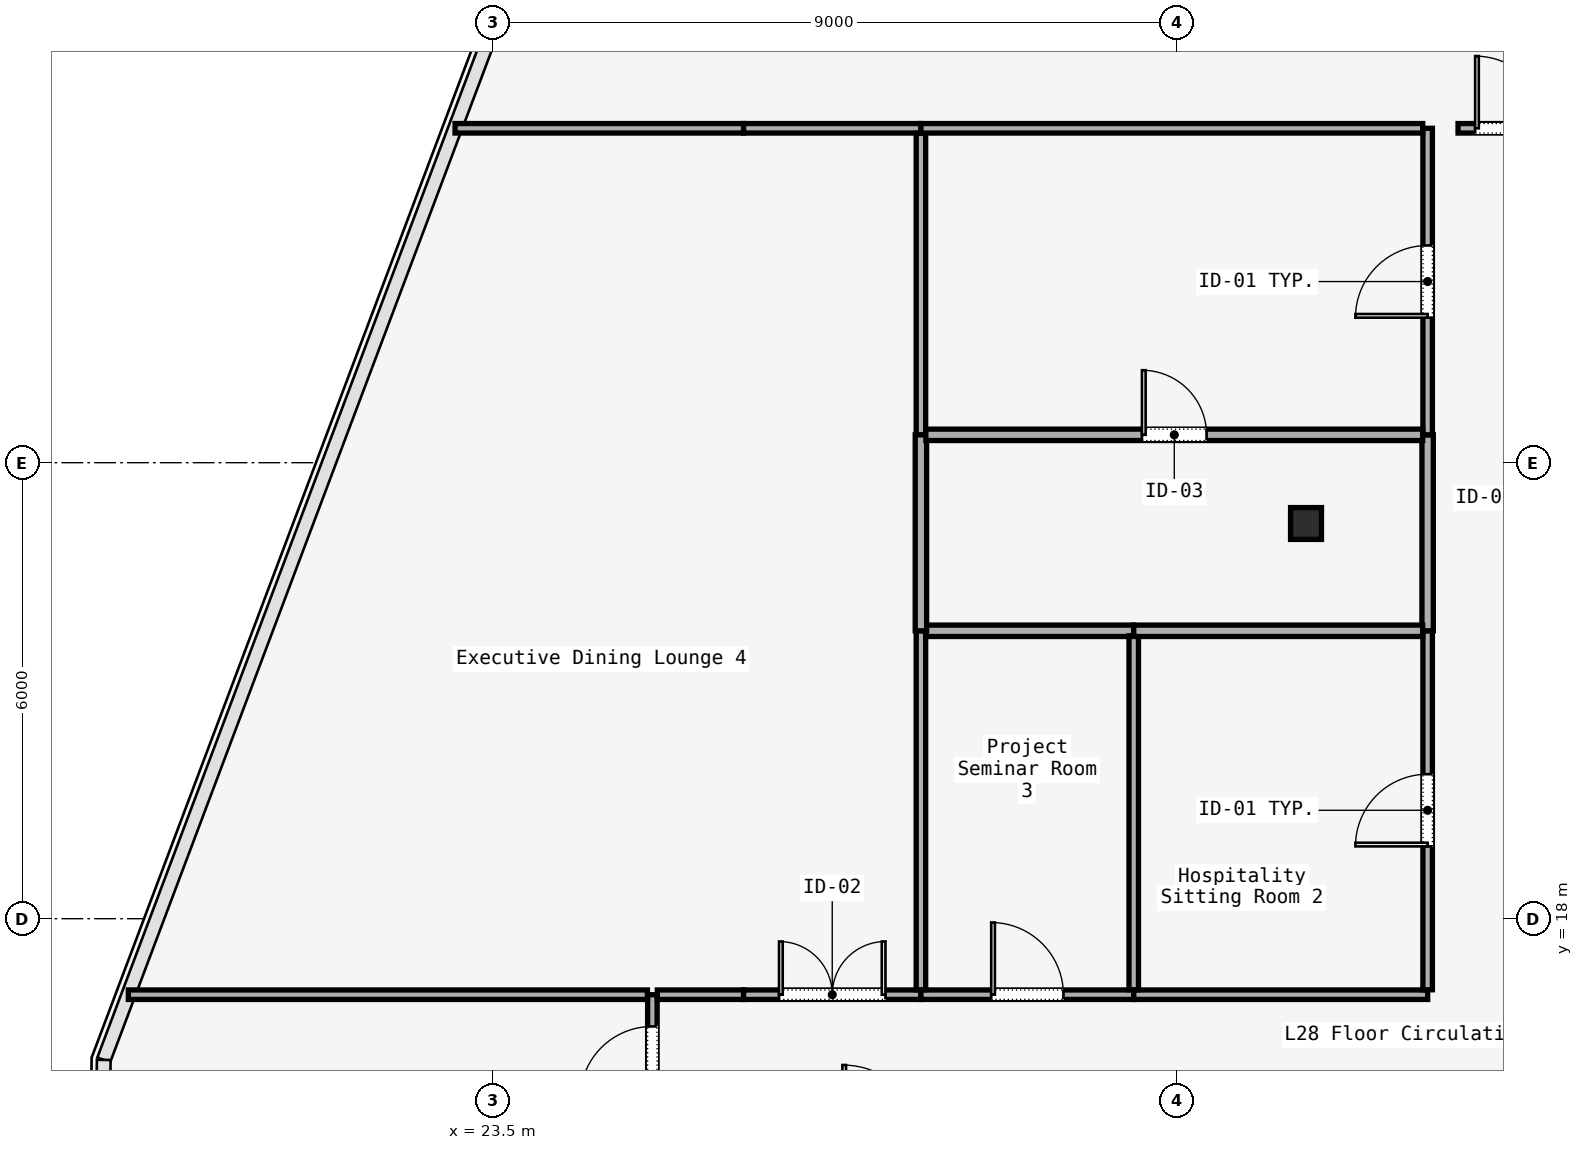
"""IFC4 building model, lengths in metres.
Left out: names, types, materials, properties, quantities, classifications, styles, units other than length and angle.
Written with IfcOpenShell. Run it as: python <this file> out.ifc"""

import sys

from ifc_helpers import new_model, si_unit, direction, frame, frame_2d, origin, origin_2d, place, context, subcontext, project, spatial, rectangle, i_section, extrude, element, fill, save


model = new_model("IFC4")
c1 = context("Model", 3, precision=1e-05, world=origin(), true_north=direction((0.0, 1.0)))
c2 = subcontext(c1, "Body", "Model", "MODEL_VIEW")
j1 = project(units=[si_unit("LENGTHUNIT", "METRE"), si_unit("PLANEANGLEUNIT", "RADIAN")], contexts=[c1])
p1 = place(None, origin())
s1 = spatial("IfcSite", under=j1, at=p1, CompositionType="ELEMENT")
p2 = place(p1, origin())
s2 = spatial("IfcBuilding", under=s1, at=p2, CompositionType="ELEMENT")
p3 = place(p2, frame((0.0, 0.0, 122.2)))
s3 = spatial("IfcBuildingStorey", under=s2, at=p3, CompositionType="ELEMENT", Elevation=122.2)
p4 = place(p3, frame((34.2, 23.2, 0.0), z_axis=(0.0, 0.0, 1.0), x_axis=(1.0, 0.0, 0.0)))
e1 = element("IfcColumn", 1, at=p4, inside=s3, PredefinedType="COLUMN", context=c2, shape_type="SweptSolid", body=[
    extrude(i_section(OverallWidth=0.407, OverallDepth=0.419, WebThickness=0.031, FlangeThickness=0.049, FilletRadius=0.015, at=origin_2d()), origin(), (0.0, 0.0, 1.0), 4.58),
])
p5 = place(p3, frame((25.6, 15.215, 0.0), z_axis=(0.0, 0.0, 1.0), x_axis=(0.0, 1.0, 0.0)))
e2 = element("IfcWall", 2, at=p5, inside=s3, PredefinedType="PARTITIONING", context=c2, shape_type="SweptSolid", body=[
    extrude(rectangle(XDim=1.785, YDim=0.125, at=frame_2d((0.893, 0.0))), origin(), (0.0, 0.0, 1.0), 4.01),
])
p6 = place(p5, frame((0.417, 0.0, 0.0)))
e3 = element("IfcOpeningElement", 3, at=p6, cuts=e2, PredefinedType="OPENING", context=c2, shape_type="SweptSolid", body=[
    extrude(rectangle(XDim=0.95, YDim=2.2, at=frame_2d((0.475, 1.1))), frame((0.0, 0.062, 0.0), z_axis=(0.0, -1.0, 0.0), x_axis=(1.0, 0.0, 0.0)), (0.0, 0.0, 1.0), 0.125),
])
p7 = place(p3, frame((25.665, 17.0, 0.0), z_axis=(0.0, 0.0, 1.0), x_axis=(1.0, 0.0, 0.0)))
e4 = element("IfcWall", 4, at=p7, inside=s3, PredefinedType="PARTITIONING", context=c2, shape_type="SweptSolid", body=[
    extrude(rectangle(XDim=1.135, YDim=0.125, at=frame_2d((0.567, 0.0))), origin(), (0.0, 0.0, 1.0), 4.01),
])
p8 = place(p3, frame((26.8, 17.0, 0.0), z_axis=(0.0, 0.0, 1.0), x_axis=(1.0, 0.0, 0.0)))
e5 = element("IfcWall", 5, at=p8, inside=s3, PredefinedType="PARTITIONING", context=c2, shape_type="SweptSolid", body=[
    extrude(rectangle(XDim=2.333, YDim=0.125, at=frame_2d((1.167, 0.0))), origin(), (0.0, 0.0, 1.0), 4.01),
])
p9 = place(p8, frame((0.467, 0.0, 0.0)))
e6 = element("IfcOpeningElement", 6, at=p9, cuts=e5, PredefinedType="OPENING", context=c2, shape_type="SweptSolid", body=[
    extrude(rectangle(XDim=1.4, YDim=2.2, at=frame_2d((0.7, 1.1))), frame((0.0, 0.062, 0.0), z_axis=(0.0, -1.0, 0.0), x_axis=(1.0, 0.0, 0.0)), (0.0, 0.0, 1.0), 0.125),
])
p10 = place(p3, frame((29.133, 17.0, 0.0), z_axis=(0.0, 0.0, 1.0), x_axis=(1.0, 0.0, 0.0)))
e7 = element("IfcWall", 7, at=p10, inside=s3, PredefinedType="PARTITIONING", context=c2, shape_type="SweptSolid", body=[
    extrude(rectangle(XDim=2.8, YDim=0.125, at=frame_2d((1.4, 0.0))), origin(), (0.0, 0.0, 1.0), 4.01),
])
p11 = place(p10, frame((0.925, 0.0, 0.0)))
e8 = element("IfcOpeningElement", 8, at=p11, cuts=e7, PredefinedType="OPENING", context=c2, shape_type="SweptSolid", body=[
    extrude(rectangle(XDim=0.95, YDim=2.2, at=frame_2d((0.475, 1.1))), frame((0.0, 0.062, 0.0), z_axis=(0.0, -1.0, 0.0), x_axis=(1.0, 0.0, 0.0)), (0.0, 0.0, 1.0), 0.125),
])
p12 = place(p3, frame((31.933, 17.0, 0.0), z_axis=(0.0, 0.0, 1.0), x_axis=(1.0, 0.0, 0.0)))
e9 = element("IfcWall", 9, at=p12, inside=s3, PredefinedType="PARTITIONING", context=c2, shape_type="SweptSolid", body=[
    extrude(rectangle(XDim=3.867, YDim=0.125, at=frame_2d((1.934, 0.0))), origin(), (0.0, 0.0, 1.0), 4.01),
])
p13 = place(p3, frame((35.8, 17.065, 0.0), z_axis=(0.0, 0.0, 1.0), x_axis=(0.0, 1.0, 0.0)))
e10 = element("IfcWall", 10, at=p13, inside=s3, PredefinedType="PARTITIONING", context=c2, shape_type="SweptSolid", body=[
    extrude(rectangle(XDim=4.723, YDim=0.125, at=frame_2d((2.362, 0.0))), origin(), (0.0, 0.0, 1.0), 4.01),
])
p14 = place(p13, frame((1.886, 0.0, 0.0)))
e11 = element("IfcOpeningElement", 11, at=p14, cuts=e10, PredefinedType="OPENING", context=c2, shape_type="SweptSolid", body=[
    extrude(rectangle(XDim=0.95, YDim=2.2, at=frame_2d((0.475, 1.1))), frame((0.0, 0.062, 0.0), z_axis=(0.0, -1.0, 0.0), x_axis=(1.0, 0.0, 0.0)), (0.0, 0.0, 1.0), 0.125),
])
p15 = place(p3, frame((35.8, 21.788, 0.0), z_axis=(0.0, 0.0, 1.0), x_axis=(0.0, 1.0, 0.0)))
e12 = element("IfcWall", 12, at=p15, inside=s3, PredefinedType="PARTITIONING", context=c2, shape_type="SweptSolid", body=[
    extrude(rectangle(XDim=2.579, YDim=0.15, at=frame_2d((1.289, 0.0))), origin(), (0.0, 0.0, 1.0), 4.01),
])
p16 = place(p3, frame((35.8, 24.367, 0.0), z_axis=(0.0, 0.0, 1.0), x_axis=(0.0, 1.0, 0.0)))
e13 = element("IfcWall", 13, at=p16, inside=s3, PredefinedType="PARTITIONING", context=c2, shape_type="SweptSolid", body=[
    extrude(rectangle(XDim=4.033, YDim=0.125, at=frame_2d((2.017, 0.0))), origin(), (0.0, 0.0, 1.0), 4.01),
])
p17 = place(p16, frame((1.542, 0.0, 0.0)))
e14 = element("IfcOpeningElement", 14, at=p17, cuts=e13, PredefinedType="OPENING", context=c2, shape_type="SweptSolid", body=[
    extrude(rectangle(XDim=0.95, YDim=2.2, at=frame_2d((0.475, 1.1))), frame((0.0, 0.062, 0.0), z_axis=(0.0, -1.0, 0.0), x_axis=(1.0, 0.0, 0.0)), (0.0, 0.0, 1.0), 0.125),
])
p18 = place(p3, frame((36.2, 28.4, 0.0), z_axis=(0.0, 0.0, 1.0), x_axis=(1.0, 0.0, 0.0)))
e15 = element("IfcWall", 15, at=p18, inside=s3, PredefinedType="PARTITIONING", context=c2, shape_type="SweptSolid", body=[
    extrude(rectangle(XDim=1.4, YDim=0.125, at=frame_2d((0.7, 0.0))), origin(), (0.0, 0.0, 1.0), 4.01),
])
p19 = place(p18, frame((0.225, 0.0, 0.0)))
e16 = element("IfcOpeningElement", 16, at=p19, cuts=e15, PredefinedType="OPENING", context=c2, shape_type="SweptSolid", body=[
    extrude(rectangle(XDim=0.95, YDim=2.2, at=frame_2d((0.475, 1.1))), frame((0.0, 0.062, 0.0), z_axis=(0.0, -1.0, 0.0), x_axis=(1.0, 0.0, 0.0)), (0.0, 0.0, 1.0), 0.125),
])
p20 = place(p3, frame((18.705, 17.0, 0.0), z_axis=(0.0, 0.0, 1.0), x_axis=(1.0, 0.0, 0.0)))
e17 = element("IfcWall", 17, at=p20, inside=s3, PredefinedType="PARTITIONING", context=c2, shape_type="SweptSolid", body=[
    extrude(rectangle(XDim=6.83, YDim=0.125, at=frame_2d((3.415, 0.0))), origin(), (0.0, 0.0, 1.0), 4.01),
])
p21 = place(p3, frame((29.133, 17.065, 0.0), z_axis=(0.0, 0.0, 1.0), x_axis=(0.0, 1.0, 0.0)))
e18 = element("IfcWall", 18, at=p21, inside=s3, PredefinedType="PARTITIONING", context=c2, shape_type="SweptSolid", body=[
    extrude(rectangle(XDim=4.723, YDim=0.125, at=frame_2d((2.362, 0.0))), origin(), (0.0, 0.0, 1.0), 4.01),
])
p22 = place(p3, frame((29.198, 21.788, 0.0), z_axis=(0.0, 0.0, 1.0), x_axis=(1.0, 0.0, 0.0)))
e19 = element("IfcWall", 19, at=p22, inside=s3, PredefinedType="PARTITIONING", context=c2, shape_type="SweptSolid", body=[
    extrude(rectangle(XDim=2.735, YDim=0.15, at=frame_2d((1.368, 0.0))), origin(), (0.0, 0.0, 1.0), 4.01),
])
p23 = place(p3, frame((31.933, 21.723, 0.0), z_axis=(0.0, 0.0, 1.0), x_axis=(0.0, -1.0, 0.0)))
e20 = element("IfcWall", 20, at=p23, inside=s3, PredefinedType="PARTITIONING", context=c2, shape_type="SweptSolid", body=[
    extrude(rectangle(XDim=4.658, YDim=0.125, at=frame_2d((2.329, 0.0))), origin(), (0.0, 0.0, 1.0), 4.01),
])
p24 = place(p3, frame((31.933, 21.788, 0.0), z_axis=(0.0, 0.0, 1.0), x_axis=(1.0, 0.0, 0.0)))
e21 = element("IfcWall", 21, at=p24, inside=s3, PredefinedType="PARTITIONING", context=c2, shape_type="SweptSolid", body=[
    extrude(rectangle(XDim=3.802, YDim=0.15, at=frame_2d((1.901, 0.0))), origin(), (0.0, 0.0, 1.0), 4.01),
])
p25 = place(p3, frame((23.004, 28.4, 0.0), z_axis=(0.0, 0.0, 1.0), x_axis=(1.0, 0.0, 0.0)))
e22 = element("IfcWall", 22, at=p25, inside=s3, PredefinedType="PARTITIONING", context=c2, shape_type="SweptSolid", body=[
    extrude(rectangle(XDim=3.796, YDim=0.125, at=frame_2d((1.898, 0.0))), origin(), (0.0, 0.0, 1.0), 4.01),
])
p26 = place(p3, frame((26.8, 28.4, 0.0), z_axis=(0.0, 0.0, 1.0), x_axis=(1.0, 0.0, 0.0)))
e23 = element("IfcWall", 23, at=p26, inside=s3, PredefinedType="PARTITIONING", context=c2, shape_type="SweptSolid", body=[
    extrude(rectangle(XDim=2.333, YDim=0.125, at=frame_2d((1.167, 0.0))), origin(), (0.0, 0.0, 1.0), 4.01),
])
p27 = place(p3, frame((29.133, 28.335, 0.0), z_axis=(0.0, 0.0, 1.0), x_axis=(0.0, -1.0, 0.0)))
e24 = element("IfcWall", 24, at=p27, inside=s3, PredefinedType="PARTITIONING", context=c2, shape_type="SweptSolid", body=[
    extrude(rectangle(XDim=3.968, YDim=0.125, at=frame_2d((1.984, 0.0))), origin(), (0.0, 0.0, 1.0), 4.01),
])
p28 = place(p3, frame((29.133, 24.367, 0.0), z_axis=(0.0, 0.0, 1.0), x_axis=(0.0, -1.0, 0.0)))
e25 = element("IfcWall", 25, at=p28, inside=s3, PredefinedType="PARTITIONING", context=c2, shape_type="SweptSolid", body=[
    extrude(rectangle(XDim=2.579, YDim=0.15, at=frame_2d((1.289, 0.0))), origin(), (0.0, 0.0, 1.0), 4.01),
])
p29 = place(p3, frame((29.198, 24.367, 0.0), z_axis=(0.0, 0.0, 1.0), x_axis=(1.0, 0.0, 0.0)))
e26 = element("IfcWall", 26, at=p29, inside=s3, PredefinedType="PARTITIONING", context=c2, shape_type="SweptSolid", body=[
    extrude(rectangle(XDim=6.537, YDim=0.15, at=frame_2d((3.269, 0.0))), origin(), (0.0, 0.0, 1.0), 4.01),
])
p30 = place(p29, frame((2.844, 0.0, 0.0)))
e27 = element("IfcOpeningElement", 27, at=p30, cuts=e26, PredefinedType="OPENING", context=c2, shape_type="SweptSolid", body=[
    extrude(rectangle(XDim=0.85, YDim=2.15, at=frame_2d((0.425, 1.075))), frame((0.0, 0.075, 0.0), z_axis=(0.0, -1.0, 0.0), x_axis=(1.0, 0.0, 0.0)), (0.0, 0.0, 1.0), 0.15),
])
p31 = place(p3, frame((29.133, 28.4, 0.0), z_axis=(0.0, 0.0, 1.0), x_axis=(1.0, 0.0, 0.0)))
e28 = element("IfcWall", 28, at=p31, inside=s3, PredefinedType="PARTITIONING", context=c2, shape_type="SweptSolid", body=[
    extrude(rectangle(XDim=6.602, YDim=0.125, at=frame_2d((3.301, 0.0))), origin(), (0.0, 0.0, 1.0), 4.01),
])
p32 = place(p6, origin())
e29 = element("IfcDoor", 29, at=p32, inside=s3, OperationType="SINGLE_SWING_LEFT", PredefinedType="DOOR", context=c2, shape_type="SweptSolid", body=[
    extrude(rectangle(XDim=0.95, YDim=2.2, at=frame_2d((0.475, 1.1))), frame((0.0, 0.025, 0.0), z_axis=(0.0, -1.0, 0.0), x_axis=(1.0, 0.0, 0.0)), (0.0, 0.0, 1.0), 0.05),
])
fill(e3, e29)
p33 = place(p11, origin())
e30 = element("IfcDoor", 30, at=p33, inside=s3, OperationType="SINGLE_SWING_RIGHT", PredefinedType="DOOR", context=c2, shape_type="SweptSolid", body=[
    extrude(rectangle(XDim=0.95, YDim=2.2, at=frame_2d((0.475, 1.1))), frame((0.0, 0.025, 0.0), z_axis=(0.0, -1.0, 0.0), x_axis=(1.0, 0.0, 0.0)), (0.0, 0.0, 1.0), 0.05),
])
fill(e8, e30)
p34 = place(p14, origin())
e31 = element("IfcDoor", 31, at=p34, inside=s3, OperationType="SINGLE_SWING_LEFT", PredefinedType="DOOR", context=c2, shape_type="SweptSolid", body=[
    extrude(rectangle(XDim=0.95, YDim=2.2, at=frame_2d((0.475, 1.1))), frame((0.0, 0.025, 0.0), z_axis=(0.0, -1.0, 0.0), x_axis=(1.0, 0.0, 0.0)), (0.0, 0.0, 1.0), 0.05),
])
fill(e11, e31)
p35 = place(p9, origin())
e32 = element("IfcDoor", 32, at=p35, inside=s3, OperationType="SINGLE_SWING_RIGHT", PredefinedType="DOOR", context=c2, shape_type="SweptSolid", body=[
    extrude(rectangle(XDim=1.4, YDim=2.2, at=frame_2d((0.7, 1.1))), frame((0.0, 0.025, 0.0), z_axis=(0.0, -1.0, 0.0), x_axis=(1.0, 0.0, 0.0)), (0.0, 0.0, 1.0), 0.05),
])
fill(e6, e32)
p36 = place(p30, origin())
e33 = element("IfcDoor", 33, at=p36, inside=s3, OperationType="SINGLE_SWING_LEFT", PredefinedType="DOOR", context=c2, shape_type="SweptSolid", body=[
    extrude(rectangle(XDim=0.85, YDim=2.15, at=frame_2d((0.425, 1.075))), frame((0.0, 0.025, 0.0), z_axis=(0.0, -1.0, 0.0), x_axis=(1.0, 0.0, 0.0)), (0.0, 0.0, 1.0), 0.05),
])
fill(e27, e33)
p37 = place(p17, origin())
e34 = element("IfcDoor", 34, at=p37, inside=s3, OperationType="SINGLE_SWING_RIGHT", PredefinedType="DOOR", context=c2, shape_type="SweptSolid", body=[
    extrude(rectangle(XDim=0.95, YDim=2.2, at=frame_2d((0.475, 1.1))), frame((0.0, 0.025, 0.0), z_axis=(0.0, -1.0, 0.0), x_axis=(1.0, 0.0, 0.0)), (0.0, 0.0, 1.0), 0.05),
])
fill(e14, e34)
p38 = place(p19, origin())
e35 = element("IfcDoor", 35, at=p38, inside=s3, OperationType="SINGLE_SWING_RIGHT", PredefinedType="DOOR", context=c2, shape_type="SweptSolid", body=[
    extrude(rectangle(XDim=0.95, YDim=2.2, at=frame_2d((0.475, 1.1))), frame((0.0, 0.025, 0.0), z_axis=(0.0, -1.0, 0.0), x_axis=(1.0, 0.0, 0.0)), (0.0, 0.0, 1.0), 0.05),
])
fill(e16, e35)
save(model, sys.argv[1])
